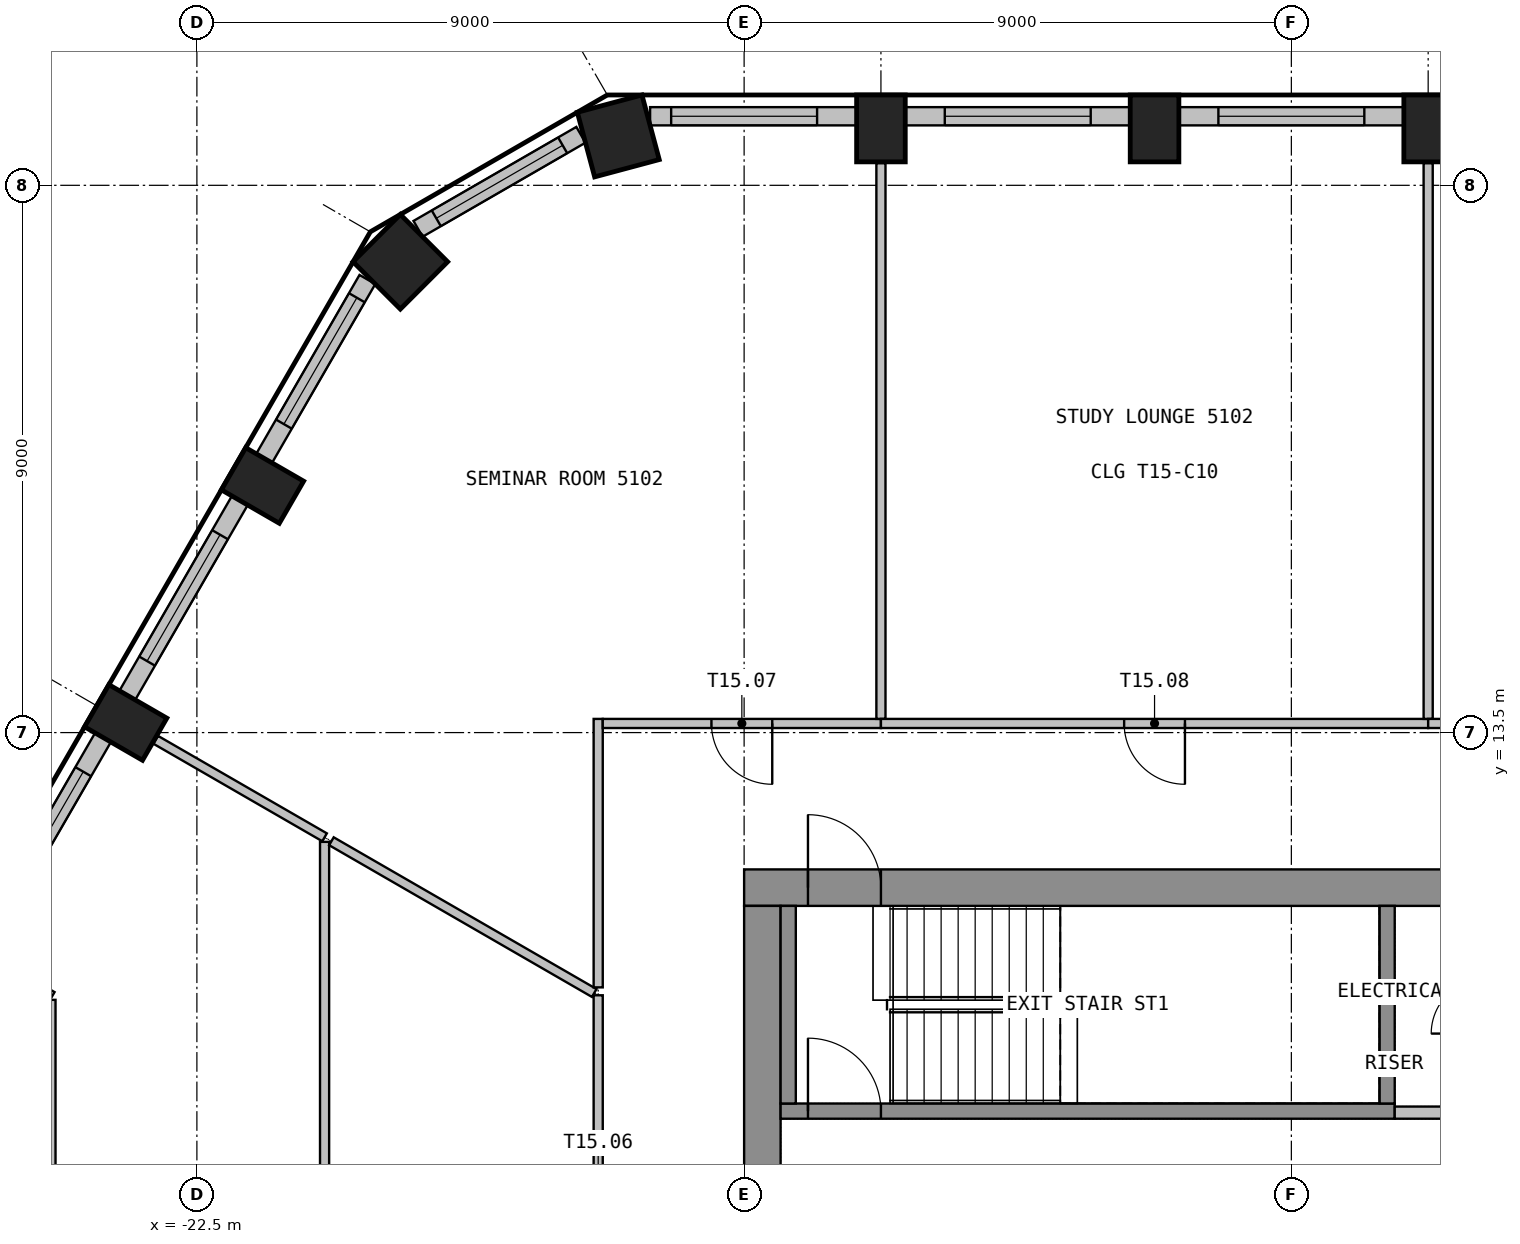
"""IFC4 building model, lengths in metres.
Left out: names, types, materials, properties, quantities, classifications, styles, units other than length and angle.
Written with IfcOpenShell. Run it as: python <this file> out.ifc"""

import sys

from ifc_helpers import new_model, si_unit, direction, frame, frame_2d, origin, origin_2d, place, context, subcontext, project, spatial, rectangle, extrude, element, fill, save


model = new_model("IFC4")
c1 = context("Model", 3, precision=1e-05, world=origin(), true_north=direction((0.0, 1.0)))
c2 = subcontext(c1, "Body", "Model", "MODEL_VIEW")
j1 = project(units=[si_unit("LENGTHUNIT", "METRE"), si_unit("PLANEANGLEUNIT", "RADIAN")], contexts=[c1])
p1 = place(None, origin())
s1 = spatial("IfcSite", under=j1, at=p1, CompositionType="ELEMENT")
p2 = place(p1, origin())
s2 = spatial("IfcBuilding", under=s1, at=p2, CompositionType="ELEMENT")
p3 = place(p2, frame((0.0, 0.0, 207.3)))
s3 = spatial("IfcBuildingStorey", under=s2, at=p3, CompositionType="ELEMENT", Elevation=207.3)
for number, where, z_axis, x_axis in (
    (1, (-2.25, 23.436, 0.0), (0.0, 0.0, 1.0), (-1.0, 0.0, 0.0)),
    (2, (-6.75, 23.436, 0.0), (0.0, 0.0, 1.0), (-1.0, 0.0, 0.0)),
    (3, (-11.25, 23.436, 0.0), (0.0, 0.0, 1.0), (-1.0, 0.0, 0.0)),
):
    element("IfcColumn", number, at=place(p3, frame(where, z_axis=z_axis, x_axis=x_axis)), inside=s3, PredefinedType="COLUMN", context=c2, shape_type="SweptSolid", body=[
        extrude(rectangle(XDim=0.8, YDim=1.1, at=origin_2d()), origin(), (0.0, 0.0, 1.0), 3.55),
    ])
for number, where, z_axis, x_axis in (
    (4, (-15.57, 23.312, 0.0), (0.0, 0.0, 1.0), (-0.966, -0.259, 0.0)),
    (5, (-19.154, 21.242, 0.0), (0.0, 0.0, 1.0), (-0.707, -0.707, 0.0)),
):
    element("IfcColumn", number, at=place(p3, frame(where, z_axis=z_axis, x_axis=x_axis)), inside=s3, PredefinedType="COLUMN", context=c2, shape_type="SweptSolid", body=[
        extrude(rectangle(XDim=1.1, YDim=1.1, at=origin_2d()), origin(), (0.0, 0.0, 1.0), 3.55),
    ])
for number, where, z_axis, x_axis in (
    (6, (-21.421, 17.563, 0.0), (0.0, 0.0, 1.0), (-0.5, -0.866, 0.0)),
    (7, (-23.671, 13.666, 0.0), (0.0, 0.0, 1.0), (-0.5, -0.866, 0.0)),
):
    element("IfcColumn", number, at=place(p3, frame(where, z_axis=z_axis, x_axis=x_axis)), inside=s3, PredefinedType="COLUMN", context=c2, shape_type="SweptSolid", body=[
        extrude(rectangle(XDim=0.8, YDim=1.1, at=origin_2d()), origin(), (0.0, 0.0, 1.0), 3.55),
    ])
p4 = place(p3, frame((-2.65, 23.635, 0.0), z_axis=(0.0, 0.0, 1.0), x_axis=(-1.0, 0.0, 0.0)))
e8 = element("IfcWall", 8, at=p4, inside=s3, PredefinedType="SOLIDWALL", context=c2, shape_type="SweptSolid", body=[
    extrude(rectangle(XDim=3.699, YDim=0.3, at=frame_2d((1.85, 0.0))), origin(), (0.0, 0.0, 1.0), 3.55),
])
p5 = place(p4, frame((0.649, 0.0, 0.9)))
e9 = element("IfcOpeningElement", 9, at=p5, cuts=e8, PredefinedType="OPENING", context=c2, shape_type="SweptSolid", body=[
    extrude(rectangle(XDim=2.4, YDim=2.1, at=frame_2d((1.2, 1.05))), frame((0.0, 0.16, 0.0), z_axis=(0.0, -1.0, 0.0), x_axis=(1.0, 0.0, 0.0)), (0.0, 0.0, 1.0), 0.32),
])
p6 = place(p3, frame((-7.15, 23.635, 0.0), z_axis=(0.0, 0.0, 1.0), x_axis=(-1.0, 0.0, 0.0)))
e10 = element("IfcWall", 10, at=p6, inside=s3, PredefinedType="SOLIDWALL", context=c2, shape_type="SweptSolid", body=[
    extrude(rectangle(XDim=3.699, YDim=0.3, at=frame_2d((1.85, 0.0))), origin(), (0.0, 0.0, 1.0), 3.55),
])
p7 = place(p6, frame((0.649, 0.0, 0.9)))
e11 = element("IfcOpeningElement", 11, at=p7, cuts=e10, PredefinedType="OPENING", context=c2, shape_type="SweptSolid", body=[
    extrude(rectangle(XDim=2.4, YDim=2.1, at=frame_2d((1.2, 1.05))), frame((0.0, 0.16, 0.0), z_axis=(0.0, -1.0, 0.0), x_axis=(1.0, 0.0, 0.0)), (0.0, 0.0, 1.0), 0.32),
])
p8 = place(p3, frame((-11.65, 23.635, 0.0), z_axis=(0.0, 0.0, 1.0), x_axis=(-1.0, 0.0, 0.0)))
e12 = element("IfcWall", 12, at=p8, inside=s3, PredefinedType="SOLIDWALL", context=c2, shape_type="SweptSolid", body=[
    extrude(rectangle(XDim=3.396, YDim=0.3, at=frame_2d((1.698, 0.0))), origin(), (0.0, 0.0, 1.0), 3.55),
])
p9 = place(p8, frame((0.649, 0.0, 0.9)))
e13 = element("IfcOpeningElement", 13, at=p9, cuts=e12, PredefinedType="OPENING", context=c2, shape_type="SweptSolid", body=[
    extrude(rectangle(XDim=2.4, YDim=2.1, at=frame_2d((1.2, 1.05))), frame((0.0, 0.16, 0.0), z_axis=(0.0, -1.0, 0.0), x_axis=(1.0, 0.0, 0.0)), (0.0, 0.0, 1.0), 0.32),
])
p10 = place(p3, frame((-16.184, 23.331, 0.0), z_axis=(0.0, 0.0, 1.0), x_axis=(-0.865994975416, -0.500052699777, 0.0)))
e14 = element("IfcWall", 14, at=p10, inside=s3, PredefinedType="SOLIDWALL", context=c2, shape_type="SweptSolid", body=[
    extrude(rectangle(XDim=3.093, YDim=0.3, at=frame_2d((1.546, 0.0))), origin(), (0.0, 0.0, 1.0), 3.55),
])
p11 = place(p10, frame((0.346, 0.0, 0.9)))
e15 = element("IfcOpeningElement", 15, at=p11, cuts=e14, PredefinedType="OPENING", context=c2, shape_type="SweptSolid", body=[
    extrude(rectangle(XDim=2.4, YDim=2.1, at=frame_2d((1.2, 1.05))), frame((0.0, 0.16, 0.0), z_axis=(0.0, -1.0, 0.0), x_axis=(1.0, 0.0, 0.0)), (0.0, 0.0, 1.0), 0.32),
])
p12 = place(p3, frame((-19.696, 20.951, 0.0), z_axis=(0.0, 0.0, 1.0), x_axis=(-0.500012868213, -0.866017974191, 0.0)))
e16 = element("IfcWall", 16, at=p12, inside=s3, PredefinedType="SOLIDWALL", context=c2, shape_type="SweptSolid", body=[
    extrude(rectangle(XDim=3.396, YDim=0.3, at=frame_2d((1.698, 0.0))), origin(), (0.0, 0.0, 1.0), 3.55),
])
p13 = place(p12, frame((0.346, 0.0, 0.9)))
e17 = element("IfcOpeningElement", 17, at=p13, cuts=e16, PredefinedType="OPENING", context=c2, shape_type="SweptSolid", body=[
    extrude(rectangle(XDim=2.4, YDim=2.1, at=frame_2d((1.2, 1.05))), frame((0.0, 0.16, 0.0), z_axis=(0.0, -1.0, 0.0), x_axis=(1.0, 0.0, 0.0)), (0.0, 0.0, 1.0), 0.32),
])
p14 = place(p3, frame((-21.794, 17.317, 0.0), z_axis=(0.0, 0.0, 1.0), x_axis=(-0.500029062817, -0.866008623709, 0.0)))
e18 = element("IfcWall", 18, at=p14, inside=s3, PredefinedType="SOLIDWALL", context=c2, shape_type="SweptSolid", body=[
    extrude(rectangle(XDim=3.699, YDim=0.3, at=frame_2d((1.85, 0.0))), origin(), (0.0, 0.0, 1.0), 3.55),
])
p15 = place(p14, frame((0.649, 0.0, 0.9)))
e19 = element("IfcOpeningElement", 19, at=p15, cuts=e18, PredefinedType="OPENING", context=c2, shape_type="SweptSolid", body=[
    extrude(rectangle(XDim=2.4, YDim=2.1, at=frame_2d((1.2, 1.05))), frame((0.0, 0.16, 0.0), z_axis=(0.0, -1.0, 0.0), x_axis=(1.0, 0.0, 0.0)), (0.0, 0.0, 1.0), 0.32),
])
p16 = place(p3, frame((-24.044, 13.419, 0.0), z_axis=(0.0, 0.0, 1.0), x_axis=(-0.500029062817, -0.866008623709, 0.0)))
e20 = element("IfcWall", 20, at=p16, inside=s3, PredefinedType="SOLIDWALL", context=c2, shape_type="SweptSolid", body=[
    extrude(rectangle(XDim=3.699, YDim=0.3, at=frame_2d((1.85, 0.0))), origin(), (0.0, 0.0, 1.0), 3.55),
])
p17 = place(p16, frame((0.649, 0.0, 0.9)))
e21 = element("IfcOpeningElement", 21, at=p17, cuts=e20, PredefinedType="OPENING", context=c2, shape_type="SweptSolid", body=[
    extrude(rectangle(XDim=2.4, YDim=2.1, at=frame_2d((1.2, 1.05))), frame((0.0, 0.16, 0.0), z_axis=(0.0, -1.0, 0.0), x_axis=(1.0, 0.0, 0.0)), (0.0, 0.0, 1.0), 0.32),
])
p18 = place(p3, frame((-13.5, 10.95, 0.0), z_axis=(0.0, 0.0, 1.0), x_axis=(1.0, 0.0, 0.0)))
e22 = element("IfcWall", 22, at=p18, inside=s3, PredefinedType="SHEAR", context=c2, shape_type="SweptSolid", body=[
    extrude(rectangle(XDim=27.0, YDim=0.6, at=frame_2d((13.5, 0.0))), origin(), (0.0, 0.0, 1.0), 3.55),
])
p19 = place(p18, frame((12.3, 0.0, 0.0)))
e23 = element("IfcOpeningElement", 23, at=p19, cuts=e22, PredefinedType="OPENING", context=c2, shape_type="SweptSolid", body=[
    extrude(rectangle(XDim=2.4, YDim=2.1, at=frame_2d((1.2, 1.05))), frame((0.0, 0.31, 0.0), z_axis=(0.0, -1.0, 0.0), x_axis=(1.0, 0.0, 0.0)), (0.0, 0.0, 1.0), 0.62),
])
p20 = place(p18, frame((1.05, 0.0, 0.0)))
e24 = element("IfcOpeningElement", 24, at=p20, cuts=e22, PredefinedType="OPENING", context=c2, shape_type="SweptSolid", body=[
    extrude(rectangle(XDim=1.2, YDim=2.1, at=frame_2d((0.6, 1.05))), frame((0.0, 0.31, 0.0), z_axis=(0.0, -1.0, 0.0), x_axis=(1.0, 0.0, 0.0)), (0.0, 0.0, 1.0), 0.62),
])
p21 = place(p18, frame((24.75, 0.0, 0.0)))
e25 = element("IfcOpeningElement", 25, at=p21, cuts=e22, PredefinedType="OPENING", context=c2, shape_type="SweptSolid", body=[
    extrude(rectangle(XDim=1.2, YDim=2.1, at=frame_2d((0.6, 1.05))), frame((0.0, 0.31, 0.0), z_axis=(0.0, -1.0, 0.0), x_axis=(1.0, 0.0, 0.0)), (0.0, 0.0, 1.0), 0.62),
])
p22 = place(p3, frame((-13.2, -10.65, 0.0), z_axis=(0.0, 0.0, 1.0), x_axis=(0.0, 1.0, 0.0)))
e26 = element("IfcWall", 26, at=p22, inside=s3, PredefinedType="SHEAR", context=c2, shape_type="SweptSolid", body=[
    extrude(rectangle(XDim=21.3, YDim=0.6, at=frame_2d((10.65, 0.0))), origin(), (0.0, 0.0, 1.0), 3.55),
])
p23 = place(p22, frame((9.45, 0.0, 0.0)))
e27 = element("IfcOpeningElement", 27, at=p23, cuts=e26, PredefinedType="OPENING", context=c2, shape_type="SweptSolid", body=[
    extrude(rectangle(XDim=2.4, YDim=2.1, at=frame_2d((1.2, 1.05))), frame((0.0, 0.31, 0.0), z_axis=(0.0, -1.0, 0.0), x_axis=(1.0, 0.0, 0.0)), (0.0, 0.0, 1.0), 0.62),
])
p24 = place(p3, frame((-12.9, 7.275, 0.0), z_axis=(0.0, 0.0, 1.0), x_axis=(1.0, 0.0, 0.0)))
e28 = element("IfcWall", 28, at=p24, inside=s3, PredefinedType="SHEAR", context=c2, shape_type="SweptSolid", body=[
    extrude(rectangle(XDim=10.1, YDim=0.25, at=frame_2d((5.05, 0.0))), origin(), (0.0, 0.0, 1.0), 3.55),
])
p25 = place(p24, frame((0.45, 0.0, 0.0)))
e29 = element("IfcOpeningElement", 29, at=p25, cuts=e28, PredefinedType="OPENING", context=c2, shape_type="SweptSolid", body=[
    extrude(rectangle(XDim=1.2, YDim=2.1, at=frame_2d((0.6, 1.05))), frame((0.0, 0.135, 0.0), z_axis=(0.0, -1.0, 0.0), x_axis=(1.0, 0.0, 0.0)), (0.0, 0.0, 1.0), 0.27),
])
for number, where, z_axis, x_axis in (
    (30, (-12.775, 7.4, 0.0), (0.0, 0.0, 1.0), (0.0, 1.0, 0.0)),
    (31, (-2.925, 7.4, 0.0), (0.0, 0.0, 1.0), (0.0, 1.0, 0.0)),
):
    element("IfcWall", number, at=place(p3, frame(where, z_axis=z_axis, x_axis=x_axis)), inside=s3, PredefinedType="SHEAR", context=c2, shape_type="SweptSolid", body=[
        extrude(rectangle(XDim=3.25, YDim=0.25, at=frame_2d((1.625, 0.0))), origin(), (0.0, 0.0, 1.0), 3.55),
    ])
p26 = place(p3, frame((-2.8, 7.25, 0.0), z_axis=(0.0, 0.0, 1.0), x_axis=(1.0, 0.0, 0.0)))
e32 = element("IfcWall", 32, at=p26, inside=s3, PredefinedType="PARTITIONING", context=c2, shape_type="SweptSolid", body=[
    extrude(rectangle(XDim=1.4, YDim=0.2, at=frame_2d((0.7, 0.0))), origin(), (0.0, 0.0, 1.0), 3.55),
])
p27 = place(p3, frame((-25.427, 9.484, 0.0), z_axis=(0.0, 0.0, 1.0), x_axis=(0.86590958411, -0.500200551925, 0.0)))
e33 = element("IfcWall", 33, at=p27, inside=s3, PredefinedType="PARTITIONING", context=c2, shape_type="SweptSolid", body=[
    extrude(rectangle(XDim=0.634, YDim=0.15, at=frame_2d((0.317, 0.0))), origin(), (0.0, 0.0, 1.0), 3.55),
])
p28 = place(p3, frame((-24.9, 9.105, 0.0), z_axis=(0.0, 0.0, 1.0), x_axis=(0.0, -1.0, 0.0)))
e34 = element("IfcWall", 34, at=p28, inside=s3, PredefinedType="PARTITIONING", context=c2, shape_type="SweptSolid", body=[
    extrude(rectangle(XDim=6.78, YDim=0.15, at=frame_2d((3.39, 0.0))), origin(), (0.0, 0.0, 1.0), 3.55),
])
p29 = place(p3, frame((-23.177, 13.381, 0.0), z_axis=(0.0, 0.0, 1.0), x_axis=(0.866089241828, -0.499889412961, 0.0)))
e35 = element("IfcWall", 35, at=p29, inside=s3, PredefinedType="PARTITIONING", context=c2, shape_type="SweptSolid", body=[
    extrude(rectangle(XDim=3.207, YDim=0.15, at=frame_2d((1.604, 0.0))), origin(), (0.0, 0.0, 1.0), 3.55),
])
p30 = place(p3, frame((-20.4, 11.703, 0.0), z_axis=(0.0, 0.0, 1.0), x_axis=(0.0, -1.0, 0.0)))
e36 = element("IfcWall", 36, at=p30, inside=s3, PredefinedType="PARTITIONING", context=c2, shape_type="SweptSolid", body=[
    extrude(rectangle(XDim=9.378, YDim=0.15, at=frame_2d((4.689, 0.0))), origin(), (0.0, 0.0, 1.0), 3.55),
])
p31 = place(p3, frame((-20.287, 11.713, 0.0), z_axis=(0.0, 0.0, 1.0), x_axis=(0.866034070548, -0.499984988425, 0.0)))
e37 = element("IfcWall", 37, at=p31, inside=s3, PredefinedType="PARTITIONING", context=c2, shape_type="SweptSolid", body=[
    extrude(rectangle(XDim=4.991, YDim=0.15, at=frame_2d((2.496, 0.0))), origin(), (0.0, 0.0, 1.0), 3.55),
])
p32 = place(p3, frame((-15.9, 9.18, 0.0), z_axis=(0.0, 0.0, 1.0), x_axis=(0.0, -1.0, 0.0)))
e38 = element("IfcWall", 38, at=p32, inside=s3, PredefinedType="PARTITIONING", context=c2, shape_type="SweptSolid", body=[
    extrude(rectangle(XDim=6.855, YDim=0.15, at=frame_2d((3.427, 0.0))), origin(), (0.0, 0.0, 1.0), 3.55),
])
p33 = place(p32, frame((2.927, 0.0, 0.0)))
e39 = element("IfcOpeningElement", 39, at=p33, cuts=e38, PredefinedType="OPENING", context=c2, shape_type="SweptSolid", body=[
    extrude(rectangle(XDim=1.0, YDim=2.1, at=frame_2d((0.5, 1.05))), frame((0.0, 0.085, 0.0), z_axis=(0.0, -1.0, 0.0), x_axis=(1.0, 0.0, 0.0)), (0.0, 0.0, 1.0), 0.17),
])
p34 = place(p3, frame((-15.9, 13.725, 0.0), z_axis=(0.0, 0.0, 1.0), x_axis=(0.0, -1.0, 0.0)))
e40 = element("IfcWall", 40, at=p34, inside=s3, PredefinedType="PARTITIONING", context=c2, shape_type="SweptSolid", body=[
    extrude(rectangle(XDim=4.415, YDim=0.15, at=frame_2d((2.208, 0.0))), origin(), (0.0, 0.0, 1.0), 3.55),
])
p35 = place(p3, frame((-11.25, 13.65, 0.0), z_axis=(0.0, 0.0, 1.0), x_axis=(-1.0, 0.0, 0.0)))
e41 = element("IfcWall", 41, at=p35, inside=s3, PredefinedType="PARTITIONING", context=c2, shape_type="SweptSolid", body=[
    extrude(rectangle(XDim=4.575, YDim=0.15, at=frame_2d((2.288, 0.0))), origin(), (0.0, 0.0, 1.0), 3.55),
])
p36 = place(p35, frame((1.788, 0.0, 0.0)))
e42 = element("IfcOpeningElement", 42, at=p36, cuts=e41, PredefinedType="OPENING", context=c2, shape_type="SweptSolid", body=[
    extrude(rectangle(XDim=1.0, YDim=2.1, at=frame_2d((0.5, 1.05))), frame((0.0, 0.085, 0.0), z_axis=(0.0, -1.0, 0.0), x_axis=(1.0, 0.0, 0.0)), (0.0, 0.0, 1.0), 0.17),
])
p37 = place(p3, frame((-11.25, 22.865, 0.0), z_axis=(0.0, 0.0, 1.0), x_axis=(0.0, -1.0, 0.0)))
e43 = element("IfcWall", 43, at=p37, inside=s3, PredefinedType="PARTITIONING", context=c2, shape_type="SweptSolid", body=[
    extrude(rectangle(XDim=9.14, YDim=0.15, at=frame_2d((4.57, 0.0))), origin(), (0.0, 0.0, 1.0), 3.55),
])
p38 = place(p3, frame((-2.25, 13.65, 0.0), z_axis=(0.0, 0.0, 1.0), x_axis=(-1.0, 0.0, 0.0)))
e44 = element("IfcWall", 44, at=p38, inside=s3, PredefinedType="PARTITIONING", context=c2, shape_type="SweptSolid", body=[
    extrude(rectangle(XDim=9.0, YDim=0.15, at=frame_2d((4.5, 0.0))), origin(), (0.0, 0.0, 1.0), 3.55),
])
p39 = place(p38, frame((4.0, 0.0, 0.0)))
e45 = element("IfcOpeningElement", 45, at=p39, cuts=e44, PredefinedType="OPENING", context=c2, shape_type="SweptSolid", body=[
    extrude(rectangle(XDim=1.0, YDim=2.1, at=frame_2d((0.5, 1.05))), frame((0.0, 0.085, 0.0), z_axis=(0.0, -1.0, 0.0), x_axis=(1.0, 0.0, 0.0)), (0.0, 0.0, 1.0), 0.17),
])
p40 = place(p3, frame((-2.25, 22.865, 0.0), z_axis=(0.0, 0.0, 1.0), x_axis=(0.0, -1.0, 0.0)))
e46 = element("IfcWall", 46, at=p40, inside=s3, PredefinedType="PARTITIONING", context=c2, shape_type="SweptSolid", body=[
    extrude(rectangle(XDim=9.14, YDim=0.15, at=frame_2d((4.57, 0.0))), origin(), (0.0, 0.0, 1.0), 3.55),
])
p41 = place(p3, frame((11.25, 13.65, 0.0), z_axis=(0.0, 0.0, 1.0), x_axis=(-1.0, 0.0, 0.0)))
e47 = element("IfcWall", 47, at=p41, inside=s3, PredefinedType="PARTITIONING", context=c2, shape_type="SweptSolid", body=[
    extrude(rectangle(XDim=13.5, YDim=0.15, at=frame_2d((6.75, 0.0))), origin(), (0.0, 0.0, 1.0), 3.55),
])
p42 = place(p41, frame((6.25, 0.0, 0.0)))
e48 = element("IfcOpeningElement", 48, at=p42, cuts=e47, PredefinedType="OPENING", context=c2, shape_type="SweptSolid", body=[
    extrude(rectangle(XDim=1.0, YDim=2.1, at=frame_2d((0.5, 1.05))), frame((0.0, 0.085, 0.0), z_axis=(0.0, -1.0, 0.0), x_axis=(1.0, 0.0, 0.0)), (0.0, 0.0, 1.0), 0.17),
])
p43 = place(p5, origin())
e49 = element("IfcWindow", 49, at=p43, inside=s3, PartitioningType="SINGLE_PANEL", PredefinedType="WINDOW", context=c2, shape_type="SweptSolid", body=[
    extrude(rectangle(XDim=2.4, YDim=2.1, at=frame_2d((1.2, 1.05))), frame((0.0, 0.03, 0.0), z_axis=(0.0, -1.0, 0.0), x_axis=(1.0, 0.0, 0.0)), (0.0, 0.0, 1.0), 0.06),
])
fill(e9, e49)
p44 = place(p7, origin())
e50 = element("IfcWindow", 50, at=p44, inside=s3, PartitioningType="SINGLE_PANEL", PredefinedType="WINDOW", context=c2, shape_type="SweptSolid", body=[
    extrude(rectangle(XDim=2.4, YDim=2.1, at=frame_2d((1.2, 1.05))), frame((0.0, 0.03, 0.0), z_axis=(0.0, -1.0, 0.0), x_axis=(1.0, 0.0, 0.0)), (0.0, 0.0, 1.0), 0.06),
])
fill(e11, e50)
p45 = place(p9, origin())
e51 = element("IfcWindow", 51, at=p45, inside=s3, PartitioningType="SINGLE_PANEL", PredefinedType="WINDOW", context=c2, shape_type="SweptSolid", body=[
    extrude(rectangle(XDim=2.4, YDim=2.1, at=frame_2d((1.2, 1.05))), frame((0.0, 0.03, 0.0), z_axis=(0.0, -1.0, 0.0), x_axis=(1.0, 0.0, 0.0)), (0.0, 0.0, 1.0), 0.06),
])
fill(e13, e51)
p46 = place(p11, origin())
e52 = element("IfcWindow", 52, at=p46, inside=s3, PartitioningType="SINGLE_PANEL", PredefinedType="WINDOW", context=c2, shape_type="SweptSolid", body=[
    extrude(rectangle(XDim=2.4, YDim=2.1, at=frame_2d((1.2, 1.05))), frame((0.0, 0.03, 0.0), z_axis=(0.0, -1.0, 0.0), x_axis=(1.0, 0.0, 0.0)), (0.0, 0.0, 1.0), 0.06),
])
fill(e15, e52)
p47 = place(p13, origin())
e53 = element("IfcWindow", 53, at=p47, inside=s3, PartitioningType="SINGLE_PANEL", PredefinedType="WINDOW", context=c2, shape_type="SweptSolid", body=[
    extrude(rectangle(XDim=2.4, YDim=2.1, at=frame_2d((1.2, 1.05))), frame((0.0, 0.03, 0.0), z_axis=(0.0, -1.0, 0.0), x_axis=(1.0, 0.0, 0.0)), (0.0, 0.0, 1.0), 0.06),
])
fill(e17, e53)
p48 = place(p15, origin())
e54 = element("IfcWindow", 54, at=p48, inside=s3, PartitioningType="SINGLE_PANEL", PredefinedType="WINDOW", context=c2, shape_type="SweptSolid", body=[
    extrude(rectangle(XDim=2.4, YDim=2.1, at=frame_2d((1.2, 1.05))), frame((0.0, 0.03, 0.0), z_axis=(0.0, -1.0, 0.0), x_axis=(1.0, 0.0, 0.0)), (0.0, 0.0, 1.0), 0.06),
])
fill(e19, e54)
p49 = place(p17, origin())
e55 = element("IfcWindow", 55, at=p49, inside=s3, PartitioningType="SINGLE_PANEL", PredefinedType="WINDOW", context=c2, shape_type="SweptSolid", body=[
    extrude(rectangle(XDim=2.4, YDim=2.1, at=frame_2d((1.2, 1.05))), frame((0.0, 0.03, 0.0), z_axis=(0.0, -1.0, 0.0), x_axis=(1.0, 0.0, 0.0)), (0.0, 0.0, 1.0), 0.06),
])
fill(e21, e55)
p50 = place(p20, origin())
e56 = element("IfcDoor", 56, at=p50, inside=s3, OperationType="SINGLE_SWING_RIGHT", PredefinedType="DOOR", context=c2, shape_type="SweptSolid", body=[
    extrude(rectangle(XDim=1.2, YDim=2.1, at=frame_2d((0.6, 1.05))), frame((0.0, 0.025, 0.0), z_axis=(0.0, -1.0, 0.0), x_axis=(1.0, 0.0, 0.0)), (0.0, 0.0, 1.0), 0.05),
])
fill(e24, e56)
p51 = place(p25, origin())
e57 = element("IfcDoor", 57, at=p51, inside=s3, OperationType="SINGLE_SWING_LEFT", PredefinedType="DOOR", context=c2, shape_type="SweptSolid", body=[
    extrude(rectangle(XDim=1.2, YDim=2.1, at=frame_2d((0.6, 1.05))), frame((0.0, 0.025, 0.0), z_axis=(0.0, -1.0, 0.0), x_axis=(1.0, 0.0, 0.0)), (0.0, 0.0, 1.0), 0.05),
])
fill(e29, e57)
p52 = place(p36, origin())
e58 = element("IfcDoor", 58, at=p52, inside=s3, OperationType="SINGLE_SWING_LEFT", PredefinedType="DOOR", context=c2, shape_type="SweptSolid", body=[
    extrude(rectangle(XDim=1.0, YDim=2.1, at=frame_2d((0.5, 1.05))), frame((0.0, 0.025, 0.0), z_axis=(0.0, -1.0, 0.0), x_axis=(1.0, 0.0, 0.0)), (0.0, 0.0, 1.0), 0.05),
])
fill(e42, e58)
p53 = place(p39, origin())
e59 = element("IfcDoor", 59, at=p53, inside=s3, OperationType="SINGLE_SWING_RIGHT", PredefinedType="DOOR", context=c2, shape_type="SweptSolid", body=[
    extrude(rectangle(XDim=1.0, YDim=2.1, at=frame_2d((0.5, 1.05))), frame((0.0, 0.025, 0.0), z_axis=(0.0, -1.0, 0.0), x_axis=(1.0, 0.0, 0.0)), (0.0, 0.0, 1.0), 0.05),
])
fill(e45, e59)
save(model, sys.argv[1])
